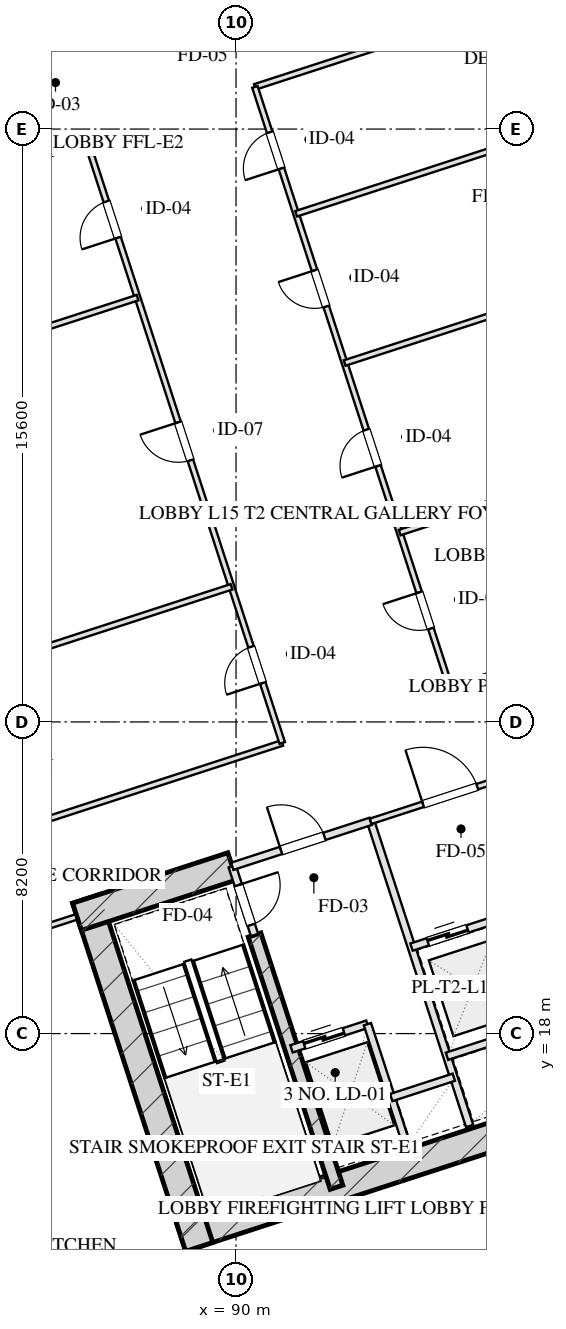
"""IFC4 building model, lengths in metres.
Left out: names, types, materials, properties, quantities, classifications, styles, units other than length and angle.
Written with IfcOpenShell. Run it as: python <this file> out.ifc"""

import sys

from ifc_helpers import new_model, si_unit, direction, frame, frame_2d, origin, place, context, subcontext, project, spatial, rectangle, extrude, element, fill, save


model = new_model("IFC4")
c1 = context("Model", 3, precision=1e-05, world=origin(), true_north=direction((0.0, 1.0)))
c2 = subcontext(c1, "Body", "Model", "MODEL_VIEW")
j1 = project(units=[si_unit("LENGTHUNIT", "METRE"), si_unit("PLANEANGLEUNIT", "RADIAN")], contexts=[c1])
p1 = place(None, origin())
s1 = spatial("IfcSite", under=j1, at=p1, CompositionType="ELEMENT")
p2 = place(p1, origin())
s2 = spatial("IfcBuilding", under=s1, at=p2, CompositionType="ELEMENT")
p3 = place(p2, frame((0.0, 0.0, 64.4)))
s3 = spatial("IfcBuildingStorey", under=s2, at=p3, CompositionType="ELEMENT", Elevation=64.4)
p4 = place(p3, frame((88.559, 12.629, 0.0), z_axis=(0.0, 0.0, 1.0), x_axis=(0.951056072937, 0.309018358888, 0.0)))
e1 = element("IfcWall", 1, at=p4, inside=s3, PredefinedType="SHEAR", context=c2, shape_type="SweptSolid", body=[
    extrude(rectangle(XDim=16.55, YDim=0.75, at=frame_2d((8.275, 0.0))), origin(), (0.0, 0.0, 1.0), 3.45),
])
p5 = place(p3, frame((86.055, 21.546, 0.0), z_axis=(0.0, 0.0, 1.0), x_axis=(0.309023585745, -0.951054374604, 0.0)))
e2 = element("IfcWall", 2, at=p5, inside=s3, PredefinedType="SHEAR", context=c2, shape_type="SweptSolid", body=[
    extrude(rectangle(XDim=9.63, YDim=0.75, at=frame_2d((4.815, 0.0))), origin(), (0.0, 0.0, 1.0), 3.45),
])
p6 = place(p3, frame((90.486, 20.594, 0.0), z_axis=(0.0, 0.0, 1.0), x_axis=(0.309020428229, -0.951055400562, 0.0)))
e3 = element("IfcWall", 3, at=p6, inside=s3, PredefinedType="SHEAR", context=c2, shape_type="SweptSolid", body=[
    extrude(rectangle(XDim=6.98, YDim=0.35, at=frame_2d((3.49, 0.0))), origin(), (0.0, 0.0, 1.0), 3.45),
])
p7 = place(p3, frame((85.814, 21.074, 0.0), z_axis=(0.0, 0.0, 1.0), x_axis=(0.95106580992, 0.308988390074, 0.0)))
e4 = element("IfcWall", 4, at=p7, inside=s3, PredefinedType="SHEAR", context=c2, shape_type="SweptSolid", body=[
    extrude(rectangle(XDim=4.295, YDim=0.75, at=frame_2d((2.147, 0.0))), origin(), (0.0, 0.0, 1.0), 3.45),
])
p8 = place(p3, frame((113.998, 12.567, 0.0), z_axis=(0.0, 0.0, 1.0), x_axis=(-0.951055939317, -0.309018770125, 0.0)))
e5 = element("IfcWall", 5, at=p8, inside=s3, PredefinedType="SOLIDWALL", context=c2, shape_type="SweptSolid", body=[
    extrude(rectangle(XDim=32.4, YDim=0.4, at=frame_2d((16.2, 0.0))), origin(), (0.0, 0.0, 1.0), 2.61),
])
p9 = place(p3, frame((89.899, 22.401, 0.0), z_axis=(0.0, 0.0, 1.0), x_axis=(0.308932062672, -0.951084108086, 0.0)))
e6 = element("IfcWall", 6, at=p9, inside=s3, PredefinedType="PARTITIONING", context=c2, shape_type="SweptSolid", body=[
    extrude(rectangle(XDim=1.9, YDim=0.2, at=frame_2d((0.95, 0.0))), origin(), (0.0, 0.0, 1.0), 3.175),
])
p10 = place(p9, frame((0.52, 0.0, 0.0)))
e7 = element("IfcOpeningElement", 7, at=p10, cuts=e6, PredefinedType="OPENING", context=c2, shape_type="SweptSolid", body=[
    extrude(rectangle(XDim=1.1, YDim=2.05, at=frame_2d((0.55, 1.025))), frame((0.0, 0.11, 0.0), z_axis=(0.0, -1.0, 0.0), x_axis=(1.0, 0.0, 0.0)), (0.0, 0.0, 1.0), 0.22),
])
p11 = place(p3, frame((93.542, 23.585, 0.0), z_axis=(0.0, 0.0, 1.0), x_axis=(0.309042196757, -0.951048327176, 0.0)))
e8 = element("IfcWall", 8, at=p11, inside=s3, PredefinedType="PARTITIONING", context=c2, shape_type="SweptSolid", body=[
    extrude(rectangle(XDim=8.43, YDim=0.2, at=frame_2d((4.215, 0.0))), origin(), (0.0, 0.0, 1.0), 3.175),
])
p12 = place(p3, frame((89.899, 22.401, 0.0), z_axis=(0.0, 0.0, 1.0), x_axis=(0.951046716504, 0.309047153403, 0.0)))
e9 = element("IfcWall", 9, at=p12, inside=s3, PredefinedType="PARTITIONING", context=c2, shape_type="SweptSolid", body=[
    extrude(rectangle(XDim=3.83, YDim=0.2, at=frame_2d((1.915, 0.0))), origin(), (0.0, 0.0, 1.0), 3.175),
])
p13 = place(p12, frame((1.35, 0.0, 0.0)))
e10 = element("IfcOpeningElement", 10, at=p13, cuts=e9, PredefinedType="OPENING", context=c2, shape_type="SweptSolid", body=[
    extrude(rectangle(XDim=1.2, YDim=2.05, at=frame_2d((0.6, 1.025))), frame((0.0, 0.11, 0.0), z_axis=(0.0, -1.0, 0.0), x_axis=(1.0, 0.0, 0.0)), (0.0, 0.0, 1.0), 0.22),
])
p14 = place(p3, frame((91.46, 17.598, 0.0), z_axis=(0.0, 0.0, 1.0), x_axis=(0.951062257173, 0.308999325213, 0.0)))
e11 = element("IfcWall", 11, at=p14, inside=s3, PredefinedType="PARTITIONING", context=c2, shape_type="SweptSolid", body=[
    extrude(rectangle(XDim=2.1, YDim=0.2, at=frame_2d((1.05, 0.0))), origin(), (0.0, 0.0, 1.0), 3.175),
])
p15 = place(p14, frame((0.35, 0.0, 0.0)))
e12 = element("IfcOpeningElement", 12, at=p15, cuts=e11, PredefinedType="OPENING", context=c2, shape_type="SweptSolid", body=[
    extrude(rectangle(XDim=1.1, YDim=2.05, at=frame_2d((0.55, 1.025))), frame((0.0, 0.11, 0.0), z_axis=(0.0, -1.0, 0.0), x_axis=(1.0, 0.0, 0.0)), (0.0, 0.0, 1.0), 0.22),
])
p16 = place(p3, frame((93.457, 18.247, 0.0), z_axis=(0.0, 0.0, 1.0), x_axis=(0.3089935693, -0.951064127245, 0.0)))
e13 = element("IfcWall", 13, at=p16, inside=s3, PredefinedType="PARTITIONING", context=c2, shape_type="SweptSolid", body=[
    extrude(rectangle(XDim=3.7, YDim=0.2, at=frame_2d((1.85, 0.0))), origin(), (0.0, 0.0, 1.0), 3.175),
])
p17 = place(p3, frame((94.084, 16.317, 0.0), z_axis=(0.0, 0.0, 1.0), x_axis=(0.951041328149, 0.309063734775, 0.0)))
e14 = element("IfcWall", 14, at=p17, inside=s3, PredefinedType="PARTITIONING", context=c2, shape_type="SweptSolid", body=[
    extrude(rectangle(XDim=1.73, YDim=0.2, at=frame_2d((0.865, 0.0))), origin(), (0.0, 0.0, 1.0), 3.175),
])
p18 = place(p3, frame((93.542, 23.585, 0.0), z_axis=(0.0, 0.0, 1.0), x_axis=(0.951063829732, 0.308994485023, 0.0)))
e15 = element("IfcWall", 15, at=p18, inside=s3, PredefinedType="PARTITIONING", context=c2, shape_type="SweptSolid", body=[
    extrude(rectangle(XDim=4.4, YDim=0.15, at=frame_2d((2.2, 0.0))), origin(), (0.0, 0.0, 1.0), 3.175),
])
p19 = place(p18, frame((1.45, 0.0, 0.0)))
e16 = element("IfcOpeningElement", 16, at=p19, cuts=e15, PredefinedType="OPENING", context=c2, shape_type="SweptSolid", body=[
    extrude(rectangle(XDim=1.5, YDim=2.05, at=frame_2d((0.75, 1.025))), frame((0.0, 0.085, 0.0), z_axis=(0.0, -1.0, 0.0), x_axis=(1.0, 0.0, 0.0)), (0.0, 0.0, 1.0), 0.17),
])
p20 = place(p3, frame((94.617, 20.275, 0.0), z_axis=(0.0, 0.0, 1.0), x_axis=(0.951058531764, 0.30901079133, 0.0)))
e17 = element("IfcWall", 17, at=p20, inside=s3, PredefinedType="PARTITIONING", context=c2, shape_type="SweptSolid", body=[
    extrude(rectangle(XDim=4.4, YDim=0.2, at=frame_2d((2.2, 0.0))), origin(), (0.0, 0.0, 1.0), 3.175),
])
p21 = place(p20, frame((0.45, 0.0, 0.0)))
e18 = element("IfcOpeningElement", 18, at=p21, cuts=e17, PredefinedType="OPENING", context=c2, shape_type="SweptSolid", body=[
    extrude(rectangle(XDim=1.1, YDim=2.05, at=frame_2d((0.55, 1.025))), frame((0.0, 0.11, 0.0), z_axis=(0.0, -1.0, 0.0), x_axis=(1.0, 0.0, 0.0)), (0.0, 0.0, 1.0), 0.22),
])
p22 = place(p20, frame((2.55, 0.0, 0.0)))
e19 = element("IfcOpeningElement", 19, at=p22, cuts=e17, PredefinedType="OPENING", context=c2, shape_type="SweptSolid", body=[
    extrude(rectangle(XDim=1.1, YDim=2.05, at=frame_2d((0.55, 1.025))), frame((0.0, 0.11, 0.0), z_axis=(0.0, -1.0, 0.0), x_axis=(1.0, 0.0, 0.0)), (0.0, 0.0, 1.0), 0.22),
])
p23 = place(p3, frame((95.551, 17.403, 0.0), z_axis=(0.0, 0.0, 1.0), x_axis=(0.951058531764, 0.30901079133, 0.0)))
e20 = element("IfcWall", 20, at=p23, inside=s3, PredefinedType="PARTITIONING", context=c2, shape_type="SweptSolid", body=[
    extrude(rectangle(XDim=4.4, YDim=0.2, at=frame_2d((2.2, 0.0))), origin(), (0.0, 0.0, 1.0), 3.175),
])
p24 = place(p3, frame((83.101, 43.324, 0.0), z_axis=(0.0, 0.0, 1.0), x_axis=(0.951052804469, 0.309028417967, 0.0)))
e21 = element("IfcWall", 21, at=p24, inside=s3, PredefinedType="PARTITIONING", context=c2, shape_type="SweptSolid", body=[
    extrude(rectangle(XDim=3.83, YDim=0.2, at=frame_2d((1.915, 0.0))), origin(), (0.0, 0.0, 1.0), 3.175),
])
p25 = place(p24, frame((1.35, 0.0, 0.0)))
e22 = element("IfcOpeningElement", 22, at=p25, cuts=e21, PredefinedType="OPENING", context=c2, shape_type="SweptSolid", body=[
    extrude(rectangle(XDim=1.2, YDim=2.05, at=frame_2d((0.6, 1.025))), frame((0.0, 0.11, 0.0), z_axis=(0.0, -1.0, 0.0), x_axis=(1.0, 0.0, 0.0)), (0.0, 0.0, 1.0), 0.22),
])
p26 = place(p3, frame((75.519, 17.729, 0.0), z_axis=(0.0, 0.0, 1.0), x_axis=(0.951056658866, 0.309016555588, 0.0)))
e23 = element("IfcWall", 23, at=p26, inside=s3, PredefinedType="PARTITIONING", context=c2, shape_type="SweptSolid", body=[
    extrude(rectangle(XDim=10.8, YDim=0.15, at=frame_2d((5.4, 0.0))), origin(), (0.0, 0.0, 1.0), 3.175),
])
p27 = place(p26, frame((4.536, 0.0, 0.0)))
e24 = element("IfcOpeningElement", 24, at=p27, cuts=e23, PredefinedType="OPENING", context=c2, shape_type="SweptSolid", body=[
    extrude(rectangle(XDim=1.0, YDim=2.05, at=frame_2d((0.5, 1.025))), frame((0.0, 0.085, 0.0), z_axis=(0.0, -1.0, 0.0), x_axis=(1.0, 0.0, 0.0)), (0.0, 0.0, 1.0), 0.17),
])
p28 = place(p3, frame((74.691, 20.278, 0.0), z_axis=(0.0, 0.0, 1.0), x_axis=(0.951053169828, 0.309027293551, 0.0)))
e25 = element("IfcWall", 25, at=p28, inside=s3, PredefinedType="PARTITIONING", context=c2, shape_type="SweptSolid", body=[
    extrude(rectangle(XDim=17.375, YDim=0.15, at=frame_2d((8.688, 0.0))), origin(), (0.0, 0.0, 1.0), 3.175),
])
p29 = place(p3, frame((95.638, 27.084, 0.0), z_axis=(0.0, 0.0, 1.0), x_axis=(0.951055837847, 0.309019082414, 0.0)))
e26 = element("IfcWall", 26, at=p29, inside=s3, PredefinedType="PARTITIONING", context=c2, shape_type="SweptSolid", body=[
    extrude(rectangle(XDim=15.575, YDim=0.15, at=frame_2d((7.788, 0.0))), origin(), (0.0, 0.0, 1.0), 3.175),
])
p30 = place(p3, frame((69.549, 36.103, 0.0), z_axis=(0.0, 0.0, 1.0), x_axis=(0.951057299418, 0.309014584159, 0.0)))
e27 = element("IfcWall", 27, at=p30, inside=s3, PredefinedType="PARTITIONING", context=c2, shape_type="SweptSolid", body=[
    extrude(rectangle(XDim=17.375, YDim=0.15, at=frame_2d((8.688, 0.0))), origin(), (0.0, 0.0, 1.0), 3.175),
])
p31 = place(p3, frame((90.496, 42.909, 0.0), z_axis=(0.0, 0.0, 1.0), x_axis=(0.951055837847, 0.309019082414, 0.0)))
e28 = element("IfcWall", 28, at=p31, inside=s3, PredefinedType="PARTITIONING", context=c2, shape_type="SweptSolid", body=[
    extrude(rectangle(XDim=15.575, YDim=0.15, at=frame_2d((7.788, 0.0))), origin(), (0.0, 0.0, 1.0), 3.175),
])
p32 = place(p3, frame((91.216, 25.647, 0.0), z_axis=(0.0, 0.0, 1.0), x_axis=(-0.309022042254, 0.951054876125, 0.0)))
e29 = element("IfcWall", 29, at=p32, inside=s3, PredefinedType="PARTITIONING", context=c2, shape_type="SweptSolid", body=[
    extrude(rectangle(XDim=16.64, YDim=0.15, at=frame_2d((8.32, 0.0))), origin(), (0.0, 0.0, 1.0), 3.175),
])
p33 = place(p32, frame((1.66, 0.0, 0.0)))
e30 = element("IfcOpeningElement", 30, at=p33, cuts=e29, PredefinedType="OPENING", context=c2, shape_type="SweptSolid", body=[
    extrude(rectangle(XDim=1.0, YDim=2.05, at=frame_2d((0.5, 1.025))), frame((0.0, 0.085, 0.0), z_axis=(0.0, -1.0, 0.0), x_axis=(1.0, 0.0, 0.0)), (0.0, 0.0, 1.0), 0.17),
])
p34 = place(p32, frame((7.82, 0.0, 0.0)))
e31 = element("IfcOpeningElement", 31, at=p34, cuts=e29, PredefinedType="OPENING", context=c2, shape_type="SweptSolid", body=[
    extrude(rectangle(XDim=1.05, YDim=2.05, at=frame_2d((0.525, 1.025))), frame((0.0, 0.085, 0.0), z_axis=(0.0, -1.0, 0.0), x_axis=(1.0, 0.0, 0.0)), (0.0, 0.0, 1.0), 0.17),
])
p35 = place(p32, frame((13.98, 0.0, 0.0)))
e32 = element("IfcOpeningElement", 32, at=p35, cuts=e29, PredefinedType="OPENING", context=c2, shape_type="SweptSolid", body=[
    extrude(rectangle(XDim=1.0, YDim=2.05, at=frame_2d((0.5, 1.025))), frame((0.0, 0.085, 0.0), z_axis=(0.0, -1.0, 0.0), x_axis=(1.0, 0.0, 0.0)), (0.0, 0.0, 1.0), 0.17),
])
p36 = place(p3, frame((95.638, 27.084, 0.0), z_axis=(0.0, 0.0, 1.0), x_axis=(-0.30901773025, 0.951056277195, 0.0)))
e33 = element("IfcWall", 33, at=p36, inside=s3, PredefinedType="PARTITIONING", context=c2, shape_type="SweptSolid", body=[
    extrude(rectangle(XDim=16.64, YDim=0.15, at=frame_2d((8.32, 0.0))), origin(), (0.0, 0.0, 1.0), 3.175),
])
p37 = place(p36, frame((1.655, 0.0, 0.0)))
e34 = element("IfcOpeningElement", 34, at=p37, cuts=e33, PredefinedType="OPENING", context=c2, shape_type="SweptSolid", body=[
    extrude(rectangle(XDim=1.0, YDim=2.05, at=frame_2d((0.5, 1.025))), frame((0.0, 0.085, 0.0), z_axis=(0.0, -1.0, 0.0), x_axis=(1.0, 0.0, 0.0)), (0.0, 0.0, 1.0), 0.17),
])
p38 = place(p36, frame((6.155, 0.0, 0.0)))
e35 = element("IfcOpeningElement", 35, at=p38, cuts=e33, PredefinedType="OPENING", context=c2, shape_type="SweptSolid", body=[
    extrude(rectangle(XDim=1.0, YDim=2.05, at=frame_2d((0.5, 1.025))), frame((0.0, 0.085, 0.0), z_axis=(0.0, -1.0, 0.0), x_axis=(1.0, 0.0, 0.0)), (0.0, 0.0, 1.0), 0.17),
])
p39 = place(p36, frame((10.565, 0.0, 0.0)))
e36 = element("IfcOpeningElement", 36, at=p39, cuts=e33, PredefinedType="OPENING", context=c2, shape_type="SweptSolid", body=[
    extrude(rectangle(XDim=1.0, YDim=2.05, at=frame_2d((0.5, 1.025))), frame((0.0, 0.085, 0.0), z_axis=(0.0, -1.0, 0.0), x_axis=(1.0, 0.0, 0.0)), (0.0, 0.0, 1.0), 0.17),
])
p40 = place(p36, frame((14.385, 0.0, 0.0)))
e37 = element("IfcOpeningElement", 37, at=p40, cuts=e33, PredefinedType="OPENING", context=c2, shape_type="SweptSolid", body=[
    extrude(rectangle(XDim=1.0, YDim=2.05, at=frame_2d((0.5, 1.025))), frame((0.0, 0.085, 0.0), z_axis=(0.0, -1.0, 0.0), x_axis=(1.0, 0.0, 0.0)), (0.0, 0.0, 1.0), 0.17),
])
for number, where, z_axis, x_axis in (
    (38, (73.356, 24.386, 0.0), (0.0, 0.0, 1.0), (0.951, 0.309, 0.0)),
    (39, (70.884, 31.995, 0.0), (0.0, 0.0, 1.0), (0.951, 0.309, 0.0)),
):
    element("IfcWall", number, at=place(p3, frame(where, z_axis=z_axis, x_axis=x_axis)), inside=s3, PredefinedType="PARTITIONING", context=c2, shape_type="SweptSolid", body=[
        extrude(rectangle(XDim=17.375, YDim=0.15, at=frame_2d((8.688, 0.0))), origin(), (0.0, 0.0, 1.0), 3.175),
    ])
for number, where, z_axis, x_axis in (
    (40, (94.306, 31.183, 0.0), (0.0, 0.0, 1.0), (0.951, 0.309, 0.0)),
    (41, (92.857, 35.643, 0.0), (0.0, 0.0, 1.0), (0.951, 0.309, 0.0)),
    (42, (91.581, 39.57, 0.0), (0.0, 0.0, 1.0), (0.951, 0.309, 0.0)),
):
    element("IfcWall", number, at=place(p3, frame(where, z_axis=z_axis, x_axis=x_axis)), inside=s3, PredefinedType="PARTITIONING", context=c2, shape_type="SweptSolid", body=[
        extrude(rectangle(XDim=15.575, YDim=0.15, at=frame_2d((7.788, 0.0))), origin(), (0.0, 0.0, 1.0), 3.175),
    ])
p41 = place(p10, origin())
e43 = element("IfcDoor", 43, at=p41, inside=s3, OperationType="SINGLE_SWING_LEFT", PredefinedType="DOOR", context=c2, shape_type="SweptSolid", body=[
    extrude(rectangle(XDim=1.1, YDim=2.05, at=frame_2d((0.55, 1.025))), frame((0.0, 0.025, 0.0), z_axis=(0.0, -1.0, 0.0), x_axis=(1.0, 0.0, 0.0)), (0.0, 0.0, 1.0), 0.05),
])
fill(e7, e43)
p42 = place(p13, origin())
e44 = element("IfcDoor", 44, at=p42, inside=s3, OperationType="SINGLE_SWING_LEFT", PredefinedType="DOOR", context=c2, shape_type="SweptSolid", body=[
    extrude(rectangle(XDim=1.2, YDim=2.05, at=frame_2d((0.6, 1.025))), frame((0.0, 0.025, 0.0), z_axis=(0.0, -1.0, 0.0), x_axis=(1.0, 0.0, 0.0)), (0.0, 0.0, 1.0), 0.05),
])
fill(e10, e44)
p43 = place(p15, origin())
e45 = element("IfcDoor", 45, at=p43, inside=s3, OperationType="DOUBLE_DOOR_SLIDING", PredefinedType="DOOR", context=c2, shape_type="SweptSolid", body=[
    extrude(rectangle(XDim=1.1, YDim=2.05, at=frame_2d((0.55, 1.025))), frame((0.0, 0.025, 0.0), z_axis=(0.0, -1.0, 0.0), x_axis=(1.0, 0.0, 0.0)), (0.0, 0.0, 1.0), 0.05),
])
fill(e12, e45)
p44 = place(p19, origin())
e46 = element("IfcDoor", 46, at=p44, inside=s3, OperationType="SINGLE_SWING_LEFT", PredefinedType="DOOR", context=c2, shape_type="SweptSolid", body=[
    extrude(rectangle(XDim=1.5, YDim=2.05, at=frame_2d((0.75, 1.025))), frame((0.0, 0.025, 0.0), z_axis=(0.0, -1.0, 0.0), x_axis=(1.0, 0.0, 0.0)), (0.0, 0.0, 1.0), 0.05),
])
fill(e16, e46)
p45 = place(p21, origin())
e47 = element("IfcDoor", 47, at=p45, inside=s3, OperationType="DOUBLE_DOOR_SLIDING", PredefinedType="DOOR", context=c2, shape_type="SweptSolid", body=[
    extrude(rectangle(XDim=1.1, YDim=2.05, at=frame_2d((0.55, 1.025))), frame((0.0, 0.025, 0.0), z_axis=(0.0, -1.0, 0.0), x_axis=(1.0, 0.0, 0.0)), (0.0, 0.0, 1.0), 0.05),
])
fill(e18, e47)
p46 = place(p25, origin())
e48 = element("IfcDoor", 48, at=p46, inside=s3, OperationType="SINGLE_SWING_LEFT", PredefinedType="DOOR", context=c2, shape_type="SweptSolid", body=[
    extrude(rectangle(XDim=1.2, YDim=2.05, at=frame_2d((0.6, 1.025))), frame((0.0, 0.025, 0.0), z_axis=(0.0, -1.0, 0.0), x_axis=(1.0, 0.0, 0.0)), (0.0, 0.0, 1.0), 0.05),
])
fill(e22, e48)
p47 = place(p33, origin())
e49 = element("IfcDoor", 49, at=p47, inside=s3, OperationType="SINGLE_SWING_LEFT", PredefinedType="DOOR", context=c2, shape_type="SweptSolid", body=[
    extrude(rectangle(XDim=1.0, YDim=2.05, at=frame_2d((0.5, 1.025))), frame((0.0, 0.025, 0.0), z_axis=(0.0, -1.0, 0.0), x_axis=(1.0, 0.0, 0.0)), (0.0, 0.0, 1.0), 0.05),
])
fill(e30, e49)
p48 = place(p34, origin())
e50 = element("IfcDoor", 50, at=p48, inside=s3, OperationType="SINGLE_SWING_RIGHT", PredefinedType="DOOR", context=c2, shape_type="SweptSolid", body=[
    extrude(rectangle(XDim=1.05, YDim=2.05, at=frame_2d((0.525, 1.025))), frame((0.0, 0.025, 0.0), z_axis=(0.0, -1.0, 0.0), x_axis=(1.0, 0.0, 0.0)), (0.0, 0.0, 1.0), 0.05),
])
fill(e31, e50)
p49 = place(p35, origin())
e51 = element("IfcDoor", 51, at=p49, inside=s3, OperationType="SINGLE_SWING_LEFT", PredefinedType="DOOR", context=c2, shape_type="SweptSolid", body=[
    extrude(rectangle(XDim=1.0, YDim=2.05, at=frame_2d((0.5, 1.025))), frame((0.0, 0.025, 0.0), z_axis=(0.0, -1.0, 0.0), x_axis=(1.0, 0.0, 0.0)), (0.0, 0.0, 1.0), 0.05),
])
fill(e32, e51)
p50 = place(p37, origin())
e52 = element("IfcDoor", 52, at=p50, inside=s3, OperationType="SINGLE_SWING_RIGHT", PredefinedType="DOOR", context=c2, shape_type="SweptSolid", body=[
    extrude(rectangle(XDim=1.0, YDim=2.05, at=frame_2d((0.5, 1.025))), frame((0.0, 0.025, 0.0), z_axis=(0.0, -1.0, 0.0), x_axis=(1.0, 0.0, 0.0)), (0.0, 0.0, 1.0), 0.05),
])
fill(e34, e52)
p51 = place(p38, origin())
e53 = element("IfcDoor", 53, at=p51, inside=s3, OperationType="SINGLE_SWING_LEFT", PredefinedType="DOOR", context=c2, shape_type="SweptSolid", body=[
    extrude(rectangle(XDim=1.0, YDim=2.05, at=frame_2d((0.5, 1.025))), frame((0.0, 0.025, 0.0), z_axis=(0.0, -1.0, 0.0), x_axis=(1.0, 0.0, 0.0)), (0.0, 0.0, 1.0), 0.05),
])
fill(e35, e53)
p52 = place(p39, origin())
e54 = element("IfcDoor", 54, at=p52, inside=s3, OperationType="SINGLE_SWING_RIGHT", PredefinedType="DOOR", context=c2, shape_type="SweptSolid", body=[
    extrude(rectangle(XDim=1.0, YDim=2.05, at=frame_2d((0.5, 1.025))), frame((0.0, 0.025, 0.0), z_axis=(0.0, -1.0, 0.0), x_axis=(1.0, 0.0, 0.0)), (0.0, 0.0, 1.0), 0.05),
])
fill(e36, e54)
p53 = place(p40, origin())
e55 = element("IfcDoor", 55, at=p53, inside=s3, OperationType="SINGLE_SWING_LEFT", PredefinedType="DOOR", context=c2, shape_type="SweptSolid", body=[
    extrude(rectangle(XDim=1.0, YDim=2.05, at=frame_2d((0.5, 1.025))), frame((0.0, 0.025, 0.0), z_axis=(0.0, -1.0, 0.0), x_axis=(1.0, 0.0, 0.0)), (0.0, 0.0, 1.0), 0.05),
])
fill(e37, e55)
save(model, sys.argv[1])
